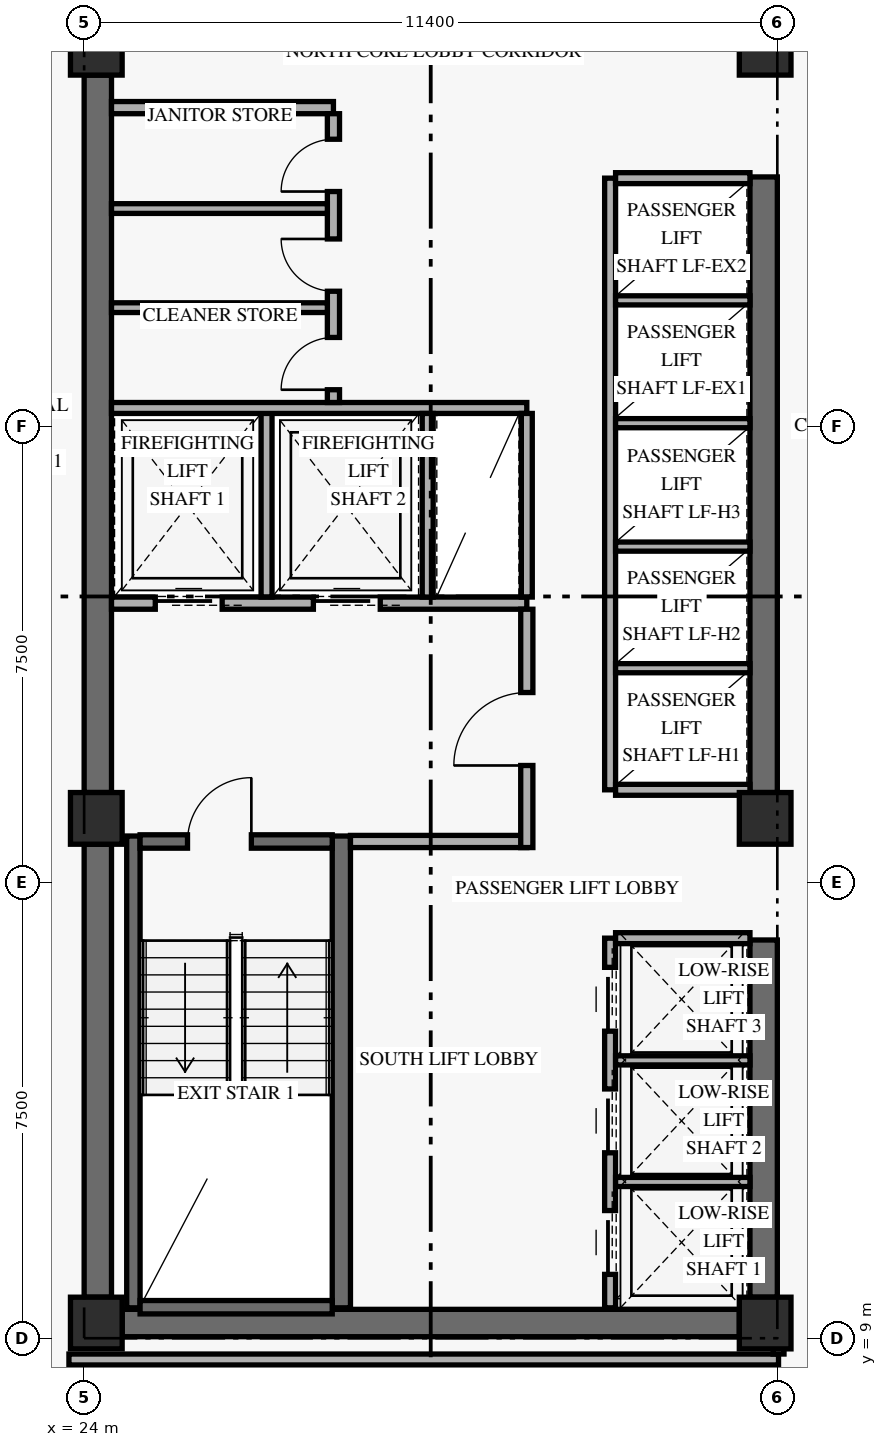
"""IFC4 building model, lengths in metres.
Left out: names, types, materials, properties, quantities, classifications, styles, units other than length and angle.
Written with IfcOpenShell. Run it as: python <this file> out.ifc"""

import sys

from ifc_helpers import new_model, si_unit, direction, frame, frame_2d, origin, origin_2d, place, context, subcontext, project, spatial, rectangle, extrude, element, fill, save


model = new_model("IFC4")
c1 = context("Model", 3, precision=1e-05, world=origin(), true_north=direction((0.0, 1.0)))
c2 = subcontext(c1, "Body", "Model", "MODEL_VIEW")
j1 = project(units=[si_unit("LENGTHUNIT", "METRE"), si_unit("PLANEANGLEUNIT", "RADIAN")], contexts=[c1])
p1 = place(None, origin())
s1 = spatial("IfcSite", under=j1, at=p1, CompositionType="ELEMENT")
p2 = place(p1, origin())
s2 = spatial("IfcBuilding", under=s1, at=p2, CompositionType="ELEMENT")
p3 = place(p2, frame((0.0, 0.0, 31.2)))
s3 = spatial("IfcBuildingStorey", under=s2, at=p3, CompositionType="ELEMENT", Elevation=31.2)
p4 = place(p3, frame((24.225, 9.675, 0.0), z_axis=(0.0, 0.0, 1.0), x_axis=(0.0, 1.0, 0.0)))
e1 = element("IfcWall", 1, at=p4, inside=s3, PredefinedType="SHEAR", context=c2, shape_type="SweptSolid", body=[
    extrude(rectangle(XDim=7.45, YDim=0.45, at=frame_2d((3.725, 0.0))), origin(), (0.0, 0.0, 1.0), 2.667),
])
p5 = place(p3, frame((24.225, 17.975, 0.0), z_axis=(0.0, 0.0, 1.0), x_axis=(0.0, 1.0, 0.0)))
e2 = element("IfcWall", 2, at=p5, inside=s3, PredefinedType="SHEAR", context=c2, shape_type="SweptSolid", body=[
    extrude(rectangle(XDim=11.8, YDim=0.45, at=frame_2d((5.9, 0.0))), origin(), (0.0, 0.0, 1.0), 2.667),
])
p6 = place(p3, frame((35.175, 9.675, 0.0), z_axis=(0.0, 0.0, 1.0), x_axis=(0.0, 1.0, 0.0)))
e3 = element("IfcWall", 3, at=p6, inside=s3, PredefinedType="SHEAR", context=c2, shape_type="SweptSolid", body=[
    extrude(rectangle(XDim=5.875, YDim=0.45, at=frame_2d((2.938, 0.0))), origin(), (0.0, 0.0, 1.0), 2.667),
])
p7 = place(p3, frame((35.175, 17.975, 0.0), z_axis=(0.0, 0.0, 1.0), x_axis=(0.0, 1.0, 0.0)))
e4 = element("IfcWall", 4, at=p7, inside=s3, PredefinedType="SHEAR", context=c2, shape_type="SweptSolid", body=[
    extrude(rectangle(XDim=10.125, YDim=0.45, at=frame_2d((5.062, 0.0))), origin(), (0.0, 0.0, 1.0), 2.667),
])
p8 = place(p3, frame((24.625, 9.25, 0.0), z_axis=(0.0, 0.0, 1.0), x_axis=(1.0, 0.0, 0.0)))
e5 = element("IfcWall", 5, at=p8, inside=s3, PredefinedType="SHEAR", context=c2, shape_type="SweptSolid", body=[
    extrude(rectangle(XDim=10.15, YDim=0.45, at=frame_2d((5.075, 0.0))), origin(), (0.0, 0.0, 1.0), 3.36),
])
p9 = place(p3, frame((24.81, 9.5, 0.0), z_axis=(0.0, 0.0, 1.0), x_axis=(0.0, 1.0, 0.0)))
e6 = element("IfcWall", 6, at=p9, inside=s3, PredefinedType="SHEAR", context=c2, shape_type="SweptSolid", body=[
    extrude(rectangle(XDim=7.76, YDim=0.22, at=frame_2d((3.88, 0.0))), origin(), (0.0, 0.0, 1.0), 3.36),
])
p10 = place(p3, frame((28.23, 9.5, 0.0), z_axis=(0.0, 0.0, 1.0), x_axis=(0.0, 1.0, 0.0)))
e7 = element("IfcWall", 7, at=p10, inside=s3, PredefinedType="SHEAR", context=c2, shape_type="SweptSolid", body=[
    extrude(rectangle(XDim=7.76, YDim=0.3, at=frame_2d((3.88, 0.0))), origin(), (0.0, 0.0, 1.0), 3.36),
])
p11 = place(p3, frame((24.92, 9.51, 0.0), z_axis=(0.0, 0.0, 1.0), x_axis=(1.0, 0.0, 0.0)))
e8 = element("IfcWall", 8, at=p11, inside=s3, PredefinedType="SHEAR", context=c2, shape_type="SweptSolid", body=[
    extrude(rectangle(XDim=3.16, YDim=0.22, at=frame_2d((1.58, 0.0))), origin(), (0.0, 0.0, 1.0), 3.36),
])
p12 = place(p3, frame((24.92, 17.17, 0.0), z_axis=(0.0, 0.0, 1.0), x_axis=(1.0, 0.0, 0.0)))
e9 = element("IfcWall", 9, at=p12, inside=s3, PredefinedType="SHEAR", context=c2, shape_type="SweptSolid", body=[
    extrude(rectangle(XDim=3.16, YDim=0.22, at=frame_2d((1.58, 0.0))), origin(), (0.0, 0.0, 1.0), 3.36),
])
p13 = place(p12, frame((0.78, 0.0, 0.0)))
e10 = element("IfcOpeningElement", 10, at=p13, cuts=e9, PredefinedType="OPENING", context=c2, shape_type="SweptSolid", body=[
    extrude(rectangle(XDim=1.05, YDim=2.15, at=frame_2d((0.525, 1.075))), frame((0.0, 0.12, 0.0), z_axis=(0.0, -1.0, 0.0), x_axis=(1.0, 0.0, 0.0)), (0.0, 0.0, 1.0), 0.24),
])
for number, where, z_axis, x_axis in (
    (11, (24.2, 9.25, 0.0), (0.0, 0.0, 1.0), (1.0, 0.0, 0.0)),
    (12, (24.2, 17.55, 0.0), (0.0, 0.0, 1.0), (1.0, 0.0, 0.0)),
    (13, (24.2, 30.2, 0.0), (0.0, 0.0, 1.0), (1.0, 0.0, 0.0)),
    (14, (35.2, 9.25, 0.0), (0.0, 0.0, 1.0), (1.0, 0.0, 0.0)),
    (15, (35.2, 17.55, 0.0), (0.0, 0.0, 1.0), (1.0, 0.0, 0.0)),
    (16, (35.2, 30.2, 0.0), (0.0, 0.0, 1.0), (1.0, 0.0, 0.0)),
):
    element("IfcColumn", number, at=place(p3, frame(where, z_axis=z_axis, x_axis=x_axis)), inside=s3, PredefinedType="COLUMN", context=c2, shape_type="SweptSolid", body=[
        extrude(rectangle(XDim=0.85, YDim=0.85, at=origin_2d()), origin(), (0.0, 0.0, 1.0), 3.6),
    ])
p14 = place(p3, frame((24.45, 21.09, 0.0), z_axis=(0.0, 0.0, 1.0), x_axis=(1.0, 0.0, 0.0)))
e17 = element("IfcWall", 17, at=p14, inside=s3, PredefinedType="STANDARD", context=c2, shape_type="SweptSolid", body=[
    extrude(rectangle(XDim=6.83, YDim=0.2, at=frame_2d((3.415, 0.0))), origin(), (0.0, 0.0, 1.0), 3.36),
])
p15 = place(p14, frame((0.72, 0.0, 0.0)))
e18 = element("IfcOpeningElement", 18, at=p15, cuts=e17, PredefinedType="OPENING", context=c2, shape_type="SweptSolid", body=[
    extrude(rectangle(XDim=1.1, YDim=2.2, at=frame_2d((0.55, 1.1))), frame((0.0, 0.11, 0.0), z_axis=(0.0, -1.0, 0.0), x_axis=(1.0, 0.0, 0.0)), (0.0, 0.0, 1.0), 0.22),
])
p16 = place(p14, frame((3.32, 0.0, 0.0)))
e19 = element("IfcOpeningElement", 19, at=p16, cuts=e17, PredefinedType="OPENING", context=c2, shape_type="SweptSolid", body=[
    extrude(rectangle(XDim=1.1, YDim=2.2, at=frame_2d((0.55, 1.1))), frame((0.0, 0.11, 0.0), z_axis=(0.0, -1.0, 0.0), x_axis=(1.0, 0.0, 0.0)), (0.0, 0.0, 1.0), 0.22),
])
p17 = place(p3, frame((28.38, 17.17, 0.0), z_axis=(0.0, 0.0, 1.0), x_axis=(1.0, 0.0, 0.0)))
e20 = element("IfcWall", 20, at=p17, inside=s3, PredefinedType="STANDARD", context=c2, shape_type="SweptSolid", body=[
    extrude(rectangle(XDim=2.9, YDim=0.2, at=frame_2d((1.45, 0.0))), origin(), (0.0, 0.0, 1.0), 3.36),
])
p18 = place(p3, frame((31.28, 17.07, 0.0), z_axis=(0.0, 0.0, 1.0), x_axis=(0.0, 1.0, 0.0)))
e21 = element("IfcWall", 21, at=p18, inside=s3, PredefinedType="STANDARD", context=c2, shape_type="SweptSolid", body=[
    extrude(rectangle(XDim=3.92, YDim=0.2, at=frame_2d((1.96, 0.0))), origin(), (0.0, 0.0, 1.0), 2.649),
])
p19 = place(p18, frame((1.35, 0.0, 0.0)))
e22 = element("IfcOpeningElement", 22, at=p19, cuts=e21, PredefinedType="OPENING", context=c2, shape_type="SweptSolid", body=[
    extrude(rectangle(XDim=1.2, YDim=2.15, at=frame_2d((0.6, 1.075))), frame((0.0, 0.11, 0.0), z_axis=(0.0, -1.0, 0.0), x_axis=(1.0, 0.0, 0.0)), (0.0, 0.0, 1.0), 0.22),
])
p20 = place(p3, frame((27.0, 21.19, 0.0), z_axis=(0.0, 0.0, 1.0), x_axis=(0.0, 1.0, 0.0)))
e23 = element("IfcWall", 23, at=p20, inside=s3, PredefinedType="STANDARD", context=c2, shape_type="SweptSolid", body=[
    extrude(rectangle(XDim=3.11, YDim=0.18, at=frame_2d((1.555, 0.0))), origin(), (0.0, 0.0, 1.0), 3.36),
])
p21 = place(p3, frame((24.45, 24.3, 0.0), z_axis=(0.0, 0.0, 1.0), x_axis=(1.0, 0.0, 0.0)))
e24 = element("IfcWall", 24, at=p21, inside=s3, PredefinedType="STANDARD", context=c2, shape_type="SweptSolid", body=[
    extrude(rectangle(XDim=6.83, YDim=0.18, at=frame_2d((3.415, 0.0))), origin(), (0.0, 0.0, 1.0), 3.36),
])
for number, where, z_axis, x_axis in (
    (25, (29.65, 21.19, 0.0), (0.0, 0.0, 1.0), (0.0, 1.0, 0.0)),
    (26, (31.28, 21.19, 0.0), (0.0, 0.0, 1.0), (0.0, 1.0, 0.0)),
):
    element("IfcWall", number, at=place(p3, frame(where, z_axis=z_axis, x_axis=x_axis)), inside=s3, PredefinedType="STANDARD", context=c2, shape_type="SweptSolid", body=[
        extrude(rectangle(XDim=3.02, YDim=0.18, at=frame_2d((1.51, 0.0))), origin(), (0.0, 0.0, 1.0), 3.36),
    ])
p22 = place(p3, frame((24.45, 29.24, 0.0), z_axis=(0.0, 0.0, 1.0), x_axis=(1.0, 0.0, 0.0)))
e27 = element("IfcWall", 27, at=p22, inside=s3, PredefinedType="STANDARD", context=c2, shape_type="SweptSolid", body=[
    extrude(rectangle(XDim=3.65, YDim=0.2, at=frame_2d((1.825, 0.0))), origin(), (0.0, 0.0, 1.0), 3.36),
])
p23 = place(p3, frame((28.1, 24.39, 0.0), z_axis=(0.0, 0.0, 1.0), x_axis=(0.0, 1.0, 0.0)))
e28 = element("IfcWall", 28, at=p23, inside=s3, PredefinedType="STANDARD", context=c2, shape_type="SweptSolid", body=[
    extrude(rectangle(XDim=4.75, YDim=0.2, at=frame_2d((2.375, 0.0))), origin(), (0.0, 0.0, 1.0), 3.36),
])
p24 = place(p23, frame((0.21, 0.0, 0.0)))
e29 = element("IfcOpeningElement", 29, at=p24, cuts=e28, PredefinedType="OPENING", context=c2, shape_type="SweptSolid", body=[
    extrude(rectangle(XDim=0.86, YDim=2.1, at=frame_2d((0.43, 1.05))), frame((0.0, 0.11, 0.0), z_axis=(0.0, -1.0, 0.0), x_axis=(1.0, 0.0, 0.0)), (0.0, 0.0, 1.0), 0.22),
])
p25 = place(p23, frame((1.83, 0.0, 0.0)))
e30 = element("IfcOpeningElement", 30, at=p25, cuts=e28, PredefinedType="OPENING", context=c2, shape_type="SweptSolid", body=[
    extrude(rectangle(XDim=0.86, YDim=2.1, at=frame_2d((0.43, 1.05))), frame((0.0, 0.11, 0.0), z_axis=(0.0, -1.0, 0.0), x_axis=(1.0, 0.0, 0.0)), (0.0, 0.0, 1.0), 0.22),
])
p26 = place(p23, frame((3.47, 0.0, 0.0)))
e31 = element("IfcOpeningElement", 31, at=p26, cuts=e28, PredefinedType="OPENING", context=c2, shape_type="SweptSolid", body=[
    extrude(rectangle(XDim=0.86, YDim=2.1, at=frame_2d((0.43, 1.05))), frame((0.0, 0.11, 0.0), z_axis=(0.0, -1.0, 0.0), x_axis=(1.0, 0.0, 0.0)), (0.0, 0.0, 1.0), 0.22),
])
for number, where, z_axis, x_axis in (
    (32, (24.45, 25.95, 0.0), (0.0, 0.0, 1.0), (1.0, 0.0, 0.0)),
    (33, (24.45, 27.58, 0.0), (0.0, 0.0, 1.0), (1.0, 0.0, 0.0)),
):
    element("IfcWall", number, at=place(p3, frame(where, z_axis=z_axis, x_axis=x_axis)), inside=s3, PredefinedType="PARTITIONING", context=c2, shape_type="SweptSolid", body=[
        extrude(rectangle(XDim=3.55, YDim=0.16, at=frame_2d((1.775, 0.0))), origin(), (0.0, 0.0, 1.0), 3.36),
    ])
p27 = place(p3, frame((32.65, 9.5, 0.0), z_axis=(0.0, 0.0, 1.0), x_axis=(0.0, 1.0, 0.0)))
e34 = element("IfcWall", 34, at=p27, inside=s3, PredefinedType="STANDARD", context=c2, shape_type="SweptSolid", body=[
    extrude(rectangle(XDim=6.08, YDim=0.18, at=frame_2d((3.04, 0.0))), origin(), (0.0, 0.0, 1.0), 3.36),
])
p28 = place(p27, frame((0.55, 0.0, 0.0)))
e35 = element("IfcOpeningElement", 35, at=p28, cuts=e34, PredefinedType="OPENING", context=c2, shape_type="SweptSolid", body=[
    extrude(rectangle(XDim=1.05, YDim=2.2, at=frame_2d((0.525, 1.1))), frame((0.0, 0.1, 0.0), z_axis=(0.0, -1.0, 0.0), x_axis=(1.0, 0.0, 0.0)), (0.0, 0.0, 1.0), 0.2),
])
p29 = place(p27, frame((2.55, 0.0, 0.0)))
e36 = element("IfcOpeningElement", 36, at=p29, cuts=e34, PredefinedType="OPENING", context=c2, shape_type="SweptSolid", body=[
    extrude(rectangle(XDim=1.05, YDim=2.2, at=frame_2d((0.525, 1.1))), frame((0.0, 0.1, 0.0), z_axis=(0.0, -1.0, 0.0), x_axis=(1.0, 0.0, 0.0)), (0.0, 0.0, 1.0), 0.2),
])
p30 = place(p27, frame((4.55, 0.0, 0.0)))
e37 = element("IfcOpeningElement", 37, at=p30, cuts=e34, PredefinedType="OPENING", context=c2, shape_type="SweptSolid", body=[
    extrude(rectangle(XDim=1.05, YDim=2.2, at=frame_2d((0.525, 1.1))), frame((0.0, 0.1, 0.0), z_axis=(0.0, -1.0, 0.0), x_axis=(1.0, 0.0, 0.0)), (0.0, 0.0, 1.0), 0.2),
])
p31 = place(p3, frame((32.74, 15.58, 0.0), z_axis=(0.0, 0.0, 1.0), x_axis=(1.0, 0.0, 0.0)))
e38 = element("IfcWall", 38, at=p31, inside=s3, PredefinedType="STANDARD", context=c2, shape_type="SweptSolid", body=[
    extrude(rectangle(XDim=2.21, YDim=0.18, at=frame_2d((1.105, 0.0))), origin(), (0.0, 0.0, 1.0), 3.36),
])
for number, where, z_axis, x_axis in (
    (39, (32.74, 11.57, 0.0), (0.0, 0.0, 1.0), (1.0, 0.0, 0.0)),
    (40, (32.74, 13.57, 0.0), (0.0, 0.0, 1.0), (1.0, 0.0, 0.0)),
):
    element("IfcWall", number, at=place(p3, frame(where, z_axis=z_axis, x_axis=x_axis)), inside=s3, PredefinedType="STANDARD", context=c2, shape_type="SweptSolid", body=[
        extrude(rectangle(XDim=2.21, YDim=0.15, at=frame_2d((1.105, 0.0))), origin(), (0.0, 0.0, 1.0), 3.36),
    ])
p32 = place(p3, frame((32.65, 18.02, 0.0), z_axis=(0.0, 0.0, 1.0), x_axis=(0.0, 1.0, 0.0)))
e41 = element("IfcWall", 41, at=p32, inside=s3, PredefinedType="STANDARD", context=c2, shape_type="SweptSolid", body=[
    extrude(rectangle(XDim=10.06, YDim=0.18, at=frame_2d((5.03, 0.0))), origin(), (0.0, 0.0, 1.0), 3.36),
])
for number, where, z_axis, x_axis in (
    (42, (32.74, 18.02, 0.0), (0.0, 0.0, 1.0), (1.0, 0.0, 0.0)),
    (43, (32.74, 28.08, 0.0), (0.0, 0.0, 1.0), (1.0, 0.0, 0.0)),
):
    element("IfcWall", number, at=place(p3, frame(where, z_axis=z_axis, x_axis=x_axis)), inside=s3, PredefinedType="STANDARD", context=c2, shape_type="SweptSolid", body=[
        extrude(rectangle(XDim=2.21, YDim=0.18, at=frame_2d((1.105, 0.0))), origin(), (0.0, 0.0, 1.0), 3.36),
    ])
for number, where, z_axis, x_axis in (
    (44, (32.74, 20.02, 0.0), (0.0, 0.0, 1.0), (1.0, 0.0, 0.0)),
    (45, (32.74, 22.02, 0.0), (0.0, 0.0, 1.0), (1.0, 0.0, 0.0)),
    (46, (32.74, 24.05, 0.0), (0.0, 0.0, 1.0), (1.0, 0.0, 0.0)),
    (47, (32.74, 26.07, 0.0), (0.0, 0.0, 1.0), (1.0, 0.0, 0.0)),
):
    element("IfcWall", number, at=place(p3, frame(where, z_axis=z_axis, x_axis=x_axis)), inside=s3, PredefinedType="STANDARD", context=c2, shape_type="SweptSolid", body=[
        extrude(rectangle(XDim=2.21, YDim=0.15, at=frame_2d((1.105, 0.0))), origin(), (0.0, 0.0, 1.0), 3.36),
    ])
p33 = place(p3, frame((23.75, 8.65, 0.0), z_axis=(0.0, 0.0, 1.0), x_axis=(1.0, 0.0, 0.0)))
e48 = element("IfcWall", 48, at=p33, inside=s3, PredefinedType="STANDARD", context=c2, shape_type="SweptSolid", body=[
    extrude(rectangle(XDim=11.67, YDim=0.18, at=frame_2d((5.835, 0.0))), origin(), (0.0, 0.0, 1.0), 2.649),
])
p34 = place(p3, frame((35.42, 8.74, 0.0), z_axis=(0.0, 0.0, 1.0), x_axis=(0.0, 1.0, 0.0)))
e49 = element("IfcWall", 49, at=p34, inside=s3, PredefinedType="STANDARD", context=c2, shape_type="SweptSolid", body=[
    extrude(rectangle(XDim=0.51, YDim=0.18, at=frame_2d((0.255, 0.0))), origin(), (0.0, 0.0, 1.0), 3.36),
])
p35 = place(p13, frame((1.05, 0.0, 0.0), z_axis=(0.0, 0.0, 1.0), x_axis=(-1.0, 0.0, 0.0)))
e50 = element("IfcDoor", 50, at=p35, inside=s3, OperationType="SINGLE_SWING_LEFT", PredefinedType="DOOR", context=c2, shape_type="SweptSolid", body=[
    extrude(rectangle(XDim=1.05, YDim=2.15, at=frame_2d((0.525, 1.075))), frame((0.0, 0.025, 0.0), z_axis=(0.0, -1.0, 0.0), x_axis=(1.0, 0.0, 0.0)), (0.0, 0.0, 1.0), 0.05),
])
fill(e10, e50)
p36 = place(p15, origin())
e51 = element("IfcDoor", 51, at=p36, inside=s3, OperationType="SLIDING_TO_LEFT", PredefinedType="DOOR", context=c2, shape_type="SweptSolid", body=[
    extrude(rectangle(XDim=1.1, YDim=2.2, at=frame_2d((0.55, 1.1))), frame((0.0, 0.025, 0.0), z_axis=(0.0, -1.0, 0.0), x_axis=(1.0, 0.0, 0.0)), (0.0, 0.0, 1.0), 0.05),
])
fill(e18, e51)
p37 = place(p16, origin())
e52 = element("IfcDoor", 52, at=p37, inside=s3, OperationType="SLIDING_TO_LEFT", PredefinedType="DOOR", context=c2, shape_type="SweptSolid", body=[
    extrude(rectangle(XDim=1.1, YDim=2.2, at=frame_2d((0.55, 1.1))), frame((0.0, 0.025, 0.0), z_axis=(0.0, -1.0, 0.0), x_axis=(1.0, 0.0, 0.0)), (0.0, 0.0, 1.0), 0.05),
])
fill(e19, e52)
p38 = place(p19, origin())
e53 = element("IfcDoor", 53, at=p38, inside=s3, OperationType="SINGLE_SWING_LEFT", PredefinedType="DOOR", context=c2, shape_type="SweptSolid", body=[
    extrude(rectangle(XDim=1.2, YDim=2.15, at=frame_2d((0.6, 1.075))), frame((0.0, 0.025, 0.0), z_axis=(0.0, -1.0, 0.0), x_axis=(1.0, 0.0, 0.0)), (0.0, 0.0, 1.0), 0.05),
])
fill(e22, e53)
p39 = place(p24, origin())
e54 = element("IfcDoor", 54, at=p39, inside=s3, OperationType="SINGLE_SWING_LEFT", PredefinedType="DOOR", context=c2, shape_type="SweptSolid", body=[
    extrude(rectangle(XDim=0.86, YDim=2.1, at=frame_2d((0.43, 1.05))), frame((0.0, 0.025, 0.0), z_axis=(0.0, -1.0, 0.0), x_axis=(1.0, 0.0, 0.0)), (0.0, 0.0, 1.0), 0.05),
])
fill(e29, e54)
p40 = place(p25, origin())
e55 = element("IfcDoor", 55, at=p40, inside=s3, OperationType="SINGLE_SWING_RIGHT", PredefinedType="DOOR", context=c2, shape_type="SweptSolid", body=[
    extrude(rectangle(XDim=0.86, YDim=2.1, at=frame_2d((0.43, 1.05))), frame((0.0, 0.025, 0.0), z_axis=(0.0, -1.0, 0.0), x_axis=(1.0, 0.0, 0.0)), (0.0, 0.0, 1.0), 0.05),
])
fill(e30, e55)
p41 = place(p26, origin())
e56 = element("IfcDoor", 56, at=p41, inside=s3, OperationType="SINGLE_SWING_LEFT", PredefinedType="DOOR", context=c2, shape_type="SweptSolid", body=[
    extrude(rectangle(XDim=0.86, YDim=2.1, at=frame_2d((0.43, 1.05))), frame((0.0, 0.025, 0.0), z_axis=(0.0, -1.0, 0.0), x_axis=(1.0, 0.0, 0.0)), (0.0, 0.0, 1.0), 0.05),
])
fill(e31, e56)
p42 = place(p28, origin())
e57 = element("IfcDoor", 57, at=p42, inside=s3, OperationType="SLIDING_TO_LEFT", PredefinedType="DOOR", context=c2, shape_type="SweptSolid", body=[
    extrude(rectangle(XDim=1.05, YDim=2.2, at=frame_2d((0.525, 1.1))), frame((0.0, 0.025, 0.0), z_axis=(0.0, -1.0, 0.0), x_axis=(1.0, 0.0, 0.0)), (0.0, 0.0, 1.0), 0.05),
])
fill(e35, e57)
p43 = place(p29, origin())
e58 = element("IfcDoor", 58, at=p43, inside=s3, OperationType="SLIDING_TO_LEFT", PredefinedType="DOOR", context=c2, shape_type="SweptSolid", body=[
    extrude(rectangle(XDim=1.05, YDim=2.2, at=frame_2d((0.525, 1.1))), frame((0.0, 0.025, 0.0), z_axis=(0.0, -1.0, 0.0), x_axis=(1.0, 0.0, 0.0)), (0.0, 0.0, 1.0), 0.05),
])
fill(e36, e58)
p44 = place(p30, origin())
e59 = element("IfcDoor", 59, at=p44, inside=s3, OperationType="SLIDING_TO_LEFT", PredefinedType="DOOR", context=c2, shape_type="SweptSolid", body=[
    extrude(rectangle(XDim=1.05, YDim=2.2, at=frame_2d((0.525, 1.1))), frame((0.0, 0.025, 0.0), z_axis=(0.0, -1.0, 0.0), x_axis=(1.0, 0.0, 0.0)), (0.0, 0.0, 1.0), 0.05),
])
fill(e37, e59)
save(model, sys.argv[1])
